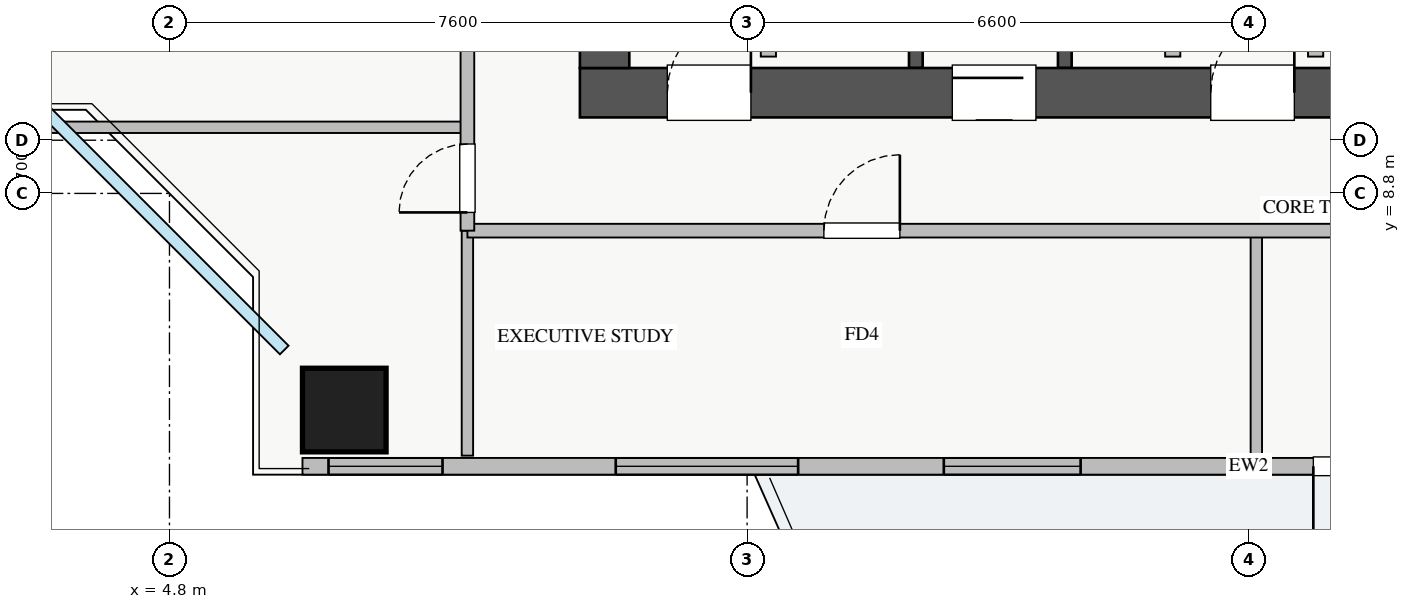
"""IFC4 building model, lengths in metres.
Left out: names, types, materials, properties, quantities, classifications, styles, units other than length and angle.
Written with IfcOpenShell. Run it as: python <this file> out.ifc"""

import sys

from ifc_helpers import new_model, si_unit, direction, frame, frame_2d, origin, origin_2d, place, context, subcontext, project, spatial, rectangle, extrude, source, transform, mapped, element, fill, save


model = new_model("IFC4")
c1 = context("Model", 3, precision=1e-05, world=origin(), true_north=direction((0.0, 1.0)))
c2 = subcontext(c1, "Body", "Model", "MODEL_VIEW")
j1 = project(units=[si_unit("LENGTHUNIT", "METRE"), si_unit("PLANEANGLEUNIT", "RADIAN")], contexts=[c1])
p1 = place(None, origin())
s1 = spatial("IfcSite", under=j1, at=p1, CompositionType="ELEMENT")
p2 = place(p1, origin())
s2 = spatial("IfcBuilding", under=s1, at=p2, CompositionType="ELEMENT")
p3 = place(p2, frame((0.0, 0.0, 123.0)))
s3 = spatial("IfcBuildingStorey", under=s2, at=p3, CompositionType="ELEMENT", Elevation=123.0)
for number, where, z_axis, x_axis in (
    (1, (14.62, 10.45, 0.0), (0.0, 0.0, 1.0), (0.0, 1.0, 0.0)),
    (2, (16.58, 10.45, 0.0), (0.0, 0.0, 1.0), (0.0, 1.0, 0.0)),
):
    element("IfcWall", number, at=place(p3, frame(where, z_axis=z_axis, x_axis=x_axis)), inside=s3, PredefinedType="SHEAR", context=c2, shape_type="SweptSolid", body=[
        extrude(rectangle(XDim=2.35, YDim=0.18, at=frame_2d((1.175, 0.0))), origin(), (0.0, 0.0, 1.0), 3.07),
    ])
p4 = place(p3, frame((10.2, 10.125, 0.0), z_axis=(0.0, 0.0, 1.0), x_axis=(1.0, 0.0, 0.0)))
e3 = element("IfcWall", 3, at=p4, inside=s3, PredefinedType="SHEAR", context=c2, shape_type="SweptSolid", body=[
    extrude(rectangle(XDim=17.6, YDim=0.65, at=frame_2d((8.8, 0.0))), origin(), (0.0, 0.0, 1.0), 3.25),
])
p5 = place(p4, frame((1.15, 0.0, 0.0)))
e4 = element("IfcOpeningElement", 4, at=p5, cuts=e3, PredefinedType="OPENING", context=c2, shape_type="SweptSolid", body=[
    extrude(rectangle(XDim=1.1, YDim=2.05, at=frame_2d((0.55, 1.025))), frame((0.0, 0.335, 0.0), z_axis=(0.0, -1.0, 0.0), x_axis=(1.0, 0.0, 0.0)), (0.0, 0.0, 1.0), 0.67),
])
p6 = place(p4, frame((8.3, 0.0, 0.0)))
e5 = element("IfcOpeningElement", 5, at=p6, cuts=e3, PredefinedType="OPENING", context=c2, shape_type="SweptSolid", body=[
    extrude(rectangle(XDim=1.1, YDim=2.05, at=frame_2d((0.55, 1.025))), frame((0.0, 0.335, 0.0), z_axis=(0.0, -1.0, 0.0), x_axis=(1.0, 0.0, 0.0)), (0.0, 0.0, 1.0), 0.67),
])
p7 = place(p4, frame((4.9, 0.0, 0.0)))
e6 = element("IfcOpeningElement", 6, at=p7, cuts=e3, PredefinedType="OPENING", context=c2, shape_type="SweptSolid", body=[
    extrude(rectangle(XDim=1.1, YDim=2.05, at=frame_2d((0.55, 1.025))), frame((0.0, 0.335, 0.0), z_axis=(0.0, -1.0, 0.0), x_axis=(1.0, 0.0, 0.0)), (0.0, 0.0, 1.0), 0.67),
])
p8 = place(p4, frame((14.74, 0.0, 0.0)))
e7 = element("IfcOpeningElement", 7, at=p8, cuts=e3, PredefinedType="OPENING", context=c2, shape_type="SweptSolid", body=[
    extrude(rectangle(XDim=1.0, YDim=2.05, at=frame_2d((0.5, 1.025))), frame((0.0, 0.335, 0.0), z_axis=(0.0, -1.0, 0.0), x_axis=(1.0, 0.0, 0.0)), (0.0, 0.0, 1.0), 0.67),
])
p9 = place(p4, frame((10.155, 0.0, 0.0)))
e8 = element("IfcOpeningElement", 8, at=p9, cuts=e3, PredefinedType="OPENING", context=c2, shape_type="SweptSolid", body=[
    extrude(rectangle(XDim=1.0, YDim=2.05, at=frame_2d((0.5, 1.025))), frame((0.0, 0.335, 0.0), z_axis=(0.0, -1.0, 0.0), x_axis=(1.0, 0.0, 0.0)), (0.0, 0.0, 1.0), 0.67),
])
p10 = place(p4, frame((11.87, 0.0, 0.0)))
e9 = element("IfcOpeningElement", 9, at=p10, cuts=e3, PredefinedType="OPENING", context=c2, shape_type="SweptSolid", body=[
    extrude(rectangle(XDim=1.0, YDim=2.05, at=frame_2d((0.5, 1.025))), frame((0.0, 0.335, 0.0), z_axis=(0.0, -1.0, 0.0), x_axis=(1.0, 0.0, 0.0)), (0.0, 0.0, 1.0), 0.67),
])
p11 = place(p4, frame((13.46, 0.0, 0.0)))
e10 = element("IfcOpeningElement", 10, at=p11, cuts=e3, PredefinedType="OPENING", context=c2, shape_type="SweptSolid", body=[
    extrude(rectangle(XDim=1.0, YDim=2.05, at=frame_2d((0.5, 1.025))), frame((0.0, 0.335, 0.0), z_axis=(0.0, -1.0, 0.0), x_axis=(1.0, 0.0, 0.0)), (0.0, 0.0, 1.0), 0.67),
])
p12 = place(p3, frame((10.525, 10.45, 0.0), z_axis=(0.0, 0.0, 1.0), x_axis=(0.0, 1.0, 0.0)))
e11 = element("IfcWall", 11, at=p12, inside=s3, PredefinedType="SHEAR", context=c2, shape_type="SweptSolid", body=[
    extrude(rectangle(XDim=5.9, YDim=0.65, at=frame_2d((2.95, 0.0))), origin(), (0.0, 0.0, 1.0), 3.25),
])
m1 = source(origin(), c2, "Body", "SweptSolid", [
    extrude(rectangle(XDim=1.1, YDim=1.1, at=origin_2d()), origin(), (0.0, 0.0, 1.0), 3.25),
])
p13 = place(p3, frame((7.1, 5.95, 0.0), z_axis=(0.0, 0.0, 1.0), x_axis=(1.0, 0.0, 0.0)))
e12 = element("IfcColumn", 12, at=p13, inside=s3, PredefinedType="COLUMN", context=c2, shape_type="MappedRepresentation", body=[
    mapped(m1, transform((0.0, 0.0, 0.0), x_axis=(1.0, 0.0, 0.0), y_axis=(0.0, 1.0, 0.0), z_axis=(0.0, 0.0, 1.0), scale=1.0)),
])
p14 = place(p3, frame((6.55, 5.21, 0.0), z_axis=(0.0, 0.0, 1.0), x_axis=(1.0, 0.0, 0.0)))
e13 = element("IfcWall", 13, at=p14, inside=s3, PredefinedType="STANDARD", context=c2, shape_type="SweptSolid", body=[
    extrude(rectangle(XDim=24.9, YDim=0.22, at=frame_2d((12.45, 0.0))), origin(), (0.0, 0.0, 1.0), 2.61),
])
p15 = place(p14, frame((13.3, 0.0, 0.0)))
e14 = element("IfcOpeningElement", 14, at=p15, cuts=e13, PredefinedType="OPENING", context=c2, shape_type="SweptSolid", body=[
    extrude(rectangle(XDim=1.2, YDim=2.1, at=frame_2d((0.6, 1.05))), frame((0.0, 0.12, 0.0), z_axis=(0.0, -1.0, 0.0), x_axis=(1.0, 0.0, 0.0)), (0.0, 0.0, 1.0), 0.24),
])
p16 = place(p14, frame((0.343, 0.0, 0.9)))
e15 = element("IfcOpeningElement", 15, at=p16, cuts=e13, PredefinedType="OPENING", context=c2, shape_type="SweptSolid", body=[
    extrude(rectangle(XDim=1.5, YDim=1.5, at=frame_2d((0.75, 0.75))), frame((0.0, 0.12, 0.0), z_axis=(0.0, -1.0, 0.0), x_axis=(1.0, 0.0, 0.0)), (0.0, 0.0, 1.0), 0.24),
])
p17 = place(p14, frame((8.438, 0.0, 0.9)))
e16 = element("IfcOpeningElement", 16, at=p17, cuts=e13, PredefinedType="OPENING", context=c2, shape_type="SweptSolid", body=[
    extrude(rectangle(XDim=1.8, YDim=1.45, at=frame_2d((0.9, 0.725))), frame((0.0, 0.12, 0.0), z_axis=(0.0, -1.0, 0.0), x_axis=(1.0, 0.0, 0.0)), (0.0, 0.0, 1.0), 0.24),
])
p18 = place(p14, frame((14.813, 0.0, 0.9)))
e17 = element("IfcOpeningElement", 17, at=p18, cuts=e13, PredefinedType="OPENING", context=c2, shape_type="SweptSolid", body=[
    extrude(rectangle(XDim=1.5, YDim=1.45, at=frame_2d((0.75, 0.725))), frame((0.0, 0.12, 0.0), z_axis=(0.0, -1.0, 0.0), x_axis=(1.0, 0.0, 0.0)), (0.0, 0.0, 1.0), 0.24),
])
p19 = place(p14, frame((20.738, 0.0, 0.9)))
e18 = element("IfcOpeningElement", 18, at=p19, cuts=e13, PredefinedType="OPENING", context=c2, shape_type="SweptSolid", body=[
    extrude(rectangle(XDim=2.1, YDim=1.48, at=frame_2d((1.05, 0.74))), frame((0.0, 0.12, 0.0), z_axis=(0.0, -1.0, 0.0), x_axis=(1.0, 0.0, 0.0)), (0.0, 0.0, 1.0), 0.24),
])
p20 = place(p14, frame((4.122, 0.0, 0.9)))
e19 = element("IfcOpeningElement", 19, at=p20, cuts=e13, PredefinedType="OPENING", context=c2, shape_type="SweptSolid", body=[
    extrude(rectangle(XDim=2.4, YDim=1.5, at=frame_2d((1.2, 0.75))), frame((0.0, 0.12, 0.0), z_axis=(0.0, -1.0, 0.0), x_axis=(1.0, 0.0, 0.0)), (0.0, 0.0, 1.0), 0.24),
])
for number, where, z_axis, x_axis in (
    (20, (12.68, 10.6, 0.0), (0.0, 0.0, 1.0), (0.0, 1.0, 0.0)),
    (21, (18.0, 10.6, 0.0), (0.0, 0.0, 1.0), (0.0, 1.0, 0.0)),
    (22, (19.88, 10.6, 0.0), (0.0, 0.0, 1.0), (0.0, 1.0, 0.0)),
):
    element("IfcWall", number, at=place(p3, frame(where, z_axis=z_axis, x_axis=x_axis)), inside=s3, PredefinedType="PARTITIONING", context=c2, shape_type="SweptSolid", body=[
        extrude(rectangle(XDim=2.21, YDim=0.2, at=frame_2d((1.105, 0.0))), origin(), (0.0, 0.0, 1.0), 3.07),
    ])
p21 = place(p3, frame((19.1, 5.35, 0.0), z_axis=(0.0, 0.0, 1.0), x_axis=(0.0, 1.0, 0.0)))
e23 = element("IfcWall", 23, at=p21, inside=s3, PredefinedType="PARTITIONING", context=c2, shape_type="SweptSolid", body=[
    extrude(rectangle(XDim=2.96, YDim=0.15, at=frame_2d((1.48, 0.0))), origin(), (0.0, 0.0, 1.0), 2.865),
])
p22 = place(p3, frame((8.72, 5.35, 0.0), z_axis=(0.0, 0.0, 1.0), x_axis=(0.0, 1.0, 0.0)))
e24 = element("IfcWall", 24, at=p22, inside=s3, PredefinedType="PARTITIONING", context=c2, shape_type="SweptSolid", body=[
    extrude(rectangle(XDim=2.96, YDim=0.15, at=frame_2d((1.48, 0.0))), origin(), (0.0, 0.0, 1.0), 3.07),
])
p23 = place(p3, frame((8.72, 8.31, 0.0), z_axis=(0.0, 0.0, 1.0), x_axis=(1.0, 0.0, 0.0)))
e25 = element("IfcWall", 25, at=p23, inside=s3, PredefinedType="PARTITIONING", context=c2, shape_type="SweptSolid", body=[
    extrude(rectangle(XDim=23.63, YDim=0.18, at=frame_2d((11.815, 0.0))), origin(), (0.0, 0.0, 1.0), 3.07),
])
p24 = place(p23, frame((4.69, 0.0, 0.0)))
e26 = element("IfcOpeningElement", 26, at=p24, cuts=e25, PredefinedType="OPENING", context=c2, shape_type="SweptSolid", body=[
    extrude(rectangle(XDim=1.0, YDim=2.05, at=frame_2d((0.5, 1.025))), frame((0.0, 0.1, 0.0), z_axis=(0.0, -1.0, 0.0), x_axis=(1.0, 0.0, 0.0)), (0.0, 0.0, 1.0), 0.2),
])
p25 = place(p23, frame((16.32, 0.0, 0.0)))
e27 = element("IfcOpeningElement", 27, at=p25, cuts=e25, PredefinedType="OPENING", context=c2, shape_type="SweptSolid", body=[
    extrude(rectangle(XDim=1.0, YDim=2.05, at=frame_2d((0.5, 1.025))), frame((0.0, 0.1, 0.0), z_axis=(0.0, -1.0, 0.0), x_axis=(1.0, 0.0, 0.0)), (0.0, 0.0, 1.0), 0.2),
])
p26 = place(p3, frame((1.35, 9.67, 0.0), z_axis=(0.0, 0.0, 1.0), x_axis=(1.0, 0.0, 0.0)))
e28 = element("IfcWall", 28, at=p26, inside=s3, PredefinedType="PARTITIONING", context=c2, shape_type="SweptSolid", body=[
    extrude(rectangle(XDim=7.37, YDim=0.15, at=frame_2d((3.685, 0.0))), origin(), (0.0, 0.0, 1.0), 3.07),
])
p27 = place(p3, frame((8.72, 8.31, 0.0), z_axis=(0.0, 0.0, 1.0), x_axis=(0.0, 1.0, 0.0)))
e29 = element("IfcWall", 29, at=p27, inside=s3, PredefinedType="PARTITIONING", context=c2, shape_type="SweptSolid", body=[
    extrude(rectangle(XDim=29.37, YDim=0.18, at=frame_2d((14.685, 0.0))), origin(), (0.0, 0.0, 1.0), 3.07),
])
p28 = place(p27, frame((28.06, 0.0, 0.0)))
e30 = element("IfcOpeningElement", 30, at=p28, cuts=e29, PredefinedType="OPENING", context=c2, shape_type="SweptSolid", body=[
    extrude(rectangle(XDim=0.9, YDim=2.05, at=frame_2d((0.45, 1.025))), frame((0.0, 0.1, 0.0), z_axis=(0.0, -1.0, 0.0), x_axis=(1.0, 0.0, 0.0)), (0.0, 0.0, 1.0), 0.2),
])
p29 = place(p27, frame((0.24, 0.0, 0.0)))
e31 = element("IfcOpeningElement", 31, at=p29, cuts=e29, PredefinedType="OPENING", context=c2, shape_type="SweptSolid", body=[
    extrude(rectangle(XDim=0.9, YDim=2.05, at=frame_2d((0.45, 1.025))), frame((0.0, 0.1, 0.0), z_axis=(0.0, -1.0, 0.0), x_axis=(1.0, 0.0, 0.0)), (0.0, 0.0, 1.0), 0.2),
])
p30 = place(p27, frame((2.92, 0.0, 0.0)))
e32 = element("IfcOpeningElement", 32, at=p30, cuts=e29, PredefinedType="OPENING", context=c2, shape_type="SweptSolid", body=[
    extrude(rectangle(XDim=1.0, YDim=2.05, at=frame_2d((0.5, 1.025))), frame((0.0, 0.1, 0.0), z_axis=(0.0, -1.0, 0.0), x_axis=(1.0, 0.0, 0.0)), (0.0, 0.0, 1.0), 0.2),
])
p31 = place(p27, frame((14.315, 0.0, 0.0)))
e33 = element("IfcOpeningElement", 33, at=p31, cuts=e29, PredefinedType="OPENING", context=c2, shape_type="SweptSolid", body=[
    extrude(rectangle(XDim=1.0, YDim=2.05, at=frame_2d((0.5, 1.025))), frame((0.0, 0.1, 0.0), z_axis=(0.0, -1.0, 0.0), x_axis=(1.0, 0.0, 0.0)), (0.0, 0.0, 1.0), 0.2),
])
p32 = place(p27, frame((20.315, 0.0, 0.0)))
e34 = element("IfcOpeningElement", 34, at=p32, cuts=e29, PredefinedType="OPENING", context=c2, shape_type="SweptSolid", body=[
    extrude(rectangle(XDim=1.0, YDim=2.05, at=frame_2d((0.5, 1.025))), frame((0.0, 0.1, 0.0), z_axis=(0.0, -1.0, 0.0), x_axis=(1.0, 0.0, 0.0)), (0.0, 0.0, 1.0), 0.2),
])
m2 = source(origin(), c2, "Body", "SweptSolid", [
    extrude(rectangle(XDim=1.2, YDim=2.1, at=frame_2d((0.6, 1.05))), frame((0.0, 0.025, 0.0), z_axis=(0.0, -1.0, 0.0), x_axis=(1.0, 0.0, 0.0)), (0.0, 0.0, 1.0), 0.05),
])
p33 = place(p15, frame((1.2, 0.0, 0.0), z_axis=(0.0, 0.0, 1.0), x_axis=(-1.0, 0.0, 0.0)))
e35 = element("IfcDoor", 35, at=p33, inside=s3, OperationType="SINGLE_SWING_LEFT", PredefinedType="DOOR", context=c2, shape_type="MappedRepresentation", body=[
    mapped(m2, transform((0.0, 0.0, 0.0), x_axis=(1.0, 0.0, 0.0), y_axis=(0.0, 1.0, 0.0), z_axis=(0.0, 0.0, 1.0), scale=1.0)),
])
fill(e14, e35)
m3 = source(origin(), c2, "Body", "SweptSolid", [
    extrude(rectangle(XDim=1.5, YDim=1.5, at=frame_2d((0.75, 0.75))), frame((0.0, 0.03, 0.0), z_axis=(0.0, -1.0, 0.0), x_axis=(1.0, 0.0, 0.0)), (0.0, 0.0, 1.0), 0.06),
])
p34 = place(p16, origin())
e36 = element("IfcWindow", 36, at=p34, inside=s3, PartitioningType="TRIPLE_PANEL_VERTICAL", PredefinedType="WINDOW", context=c2, shape_type="MappedRepresentation", body=[
    mapped(m3, transform((0.0, 0.0, 0.0), x_axis=(1.0, 0.0, 0.0), y_axis=(0.0, 1.0, 0.0), z_axis=(0.0, 0.0, 1.0), scale=1.0)),
])
fill(e15, e36)
m4 = source(origin(), c2, "Body", "SweptSolid", [
    extrude(rectangle(XDim=1.8, YDim=1.45, at=frame_2d((0.9, 0.725))), frame((0.0, 0.03, 0.0), z_axis=(0.0, -1.0, 0.0), x_axis=(1.0, 0.0, 0.0)), (0.0, 0.0, 1.0), 0.06),
])
p35 = place(p17, origin())
e37 = element("IfcWindow", 37, at=p35, inside=s3, PartitioningType="DOUBLE_PANEL_VERTICAL", PredefinedType="WINDOW", context=c2, shape_type="MappedRepresentation", body=[
    mapped(m4, transform((0.0, 0.0, 0.0), x_axis=(1.0, 0.0, 0.0), y_axis=(0.0, 1.0, 0.0), z_axis=(0.0, 0.0, 1.0), scale=1.0)),
])
fill(e16, e37)
m5 = source(origin(), c2, "Body", "SweptSolid", [
    extrude(rectangle(XDim=1.1, YDim=2.05, at=frame_2d((0.55, 1.025))), frame((0.0, 0.025, 0.0), z_axis=(0.0, -1.0, 0.0), x_axis=(1.0, 0.0, 0.0)), (0.0, 0.0, 1.0), 0.05),
])
p36 = place(p5, origin())
e38 = element("IfcDoor", 38, at=p36, inside=s3, OperationType="SINGLE_SWING_RIGHT", PredefinedType="DOOR", context=c2, shape_type="MappedRepresentation", body=[
    mapped(m5, transform((0.0, 0.0, 0.0), x_axis=(1.0, 0.0, 0.0), y_axis=(0.0, 1.0, 0.0), z_axis=(0.0, 0.0, 1.0), scale=1.0)),
])
fill(e4, e38)
p37 = place(p6, origin())
e39 = element("IfcDoor", 39, at=p37, inside=s3, OperationType="SINGLE_SWING_RIGHT", PredefinedType="DOOR", context=c2, shape_type="MappedRepresentation", body=[
    mapped(m5, transform((0.0, 0.0, 0.0), x_axis=(1.0, 0.0, 0.0), y_axis=(0.0, 1.0, 0.0), z_axis=(0.0, 0.0, 1.0), scale=1.0)),
])
fill(e5, e39)
p38 = place(p7, origin())
e40 = element("IfcDoor", 40, at=p38, inside=s3, OperationType="SLIDING_TO_RIGHT", PredefinedType="DOOR", context=c2, shape_type="MappedRepresentation", body=[
    mapped(m5, transform((0.0, 0.0, 0.0), x_axis=(1.0, 0.0, 0.0), y_axis=(0.0, 1.0, 0.0), z_axis=(0.0, 0.0, 1.0), scale=1.0)),
])
fill(e6, e40)
m6 = source(origin(), c2, "Body", "SweptSolid", [
    extrude(rectangle(XDim=1.0, YDim=2.05, at=frame_2d((0.5, 1.025))), frame((0.0, 0.025, 0.0), z_axis=(0.0, -1.0, 0.0), x_axis=(1.0, 0.0, 0.0)), (0.0, 0.0, 1.0), 0.05),
])
p39 = place(p24, origin())
e41 = element("IfcDoor", 41, at=p39, inside=s3, OperationType="SINGLE_SWING_RIGHT", PredefinedType="DOOR", context=c2, shape_type="MappedRepresentation", body=[
    mapped(m6, transform((0.0, 0.0, 0.0), x_axis=(1.0, 0.0, 0.0), y_axis=(0.0, 1.0, 0.0), z_axis=(0.0, 0.0, 1.0), scale=1.0)),
])
fill(e26, e41)
m7 = source(origin(), c2, "Body", "SweptSolid", [
    extrude(rectangle(XDim=0.9, YDim=2.05, at=frame_2d((0.45, 1.025))), frame((0.0, 0.025, 0.0), z_axis=(0.0, -1.0, 0.0), x_axis=(1.0, 0.0, 0.0)), (0.0, 0.0, 1.0), 0.05),
])
p40 = place(p29, origin())
e42 = element("IfcDoor", 42, at=p40, inside=s3, OperationType="SINGLE_SWING_LEFT", PredefinedType="DOOR", context=c2, shape_type="MappedRepresentation", body=[
    mapped(m7, transform((0.0, 0.0, 0.0), x_axis=(1.0, 0.0, 0.0), y_axis=(0.0, 1.0, 0.0), z_axis=(0.0, 0.0, 1.0), scale=1.0)),
])
fill(e31, e42)
m8 = source(origin(), c2, "Body", "SweptSolid", [
    extrude(rectangle(XDim=2.4, YDim=1.5, at=frame_2d((1.2, 0.75))), frame((0.0, 0.03, 0.0), z_axis=(0.0, -1.0, 0.0), x_axis=(1.0, 0.0, 0.0)), (0.0, 0.0, 1.0), 0.06),
])
p41 = place(p20, origin())
e43 = element("IfcWindow", 43, at=p41, inside=s3, PartitioningType="TRIPLE_PANEL_VERTICAL", PredefinedType="WINDOW", context=c2, shape_type="MappedRepresentation", body=[
    mapped(m8, transform((0.0, 0.0, 0.0), x_axis=(1.0, 0.0, 0.0), y_axis=(0.0, 1.0, 0.0), z_axis=(0.0, 0.0, 1.0), scale=1.0)),
])
fill(e19, e43)
save(model, sys.argv[1])
